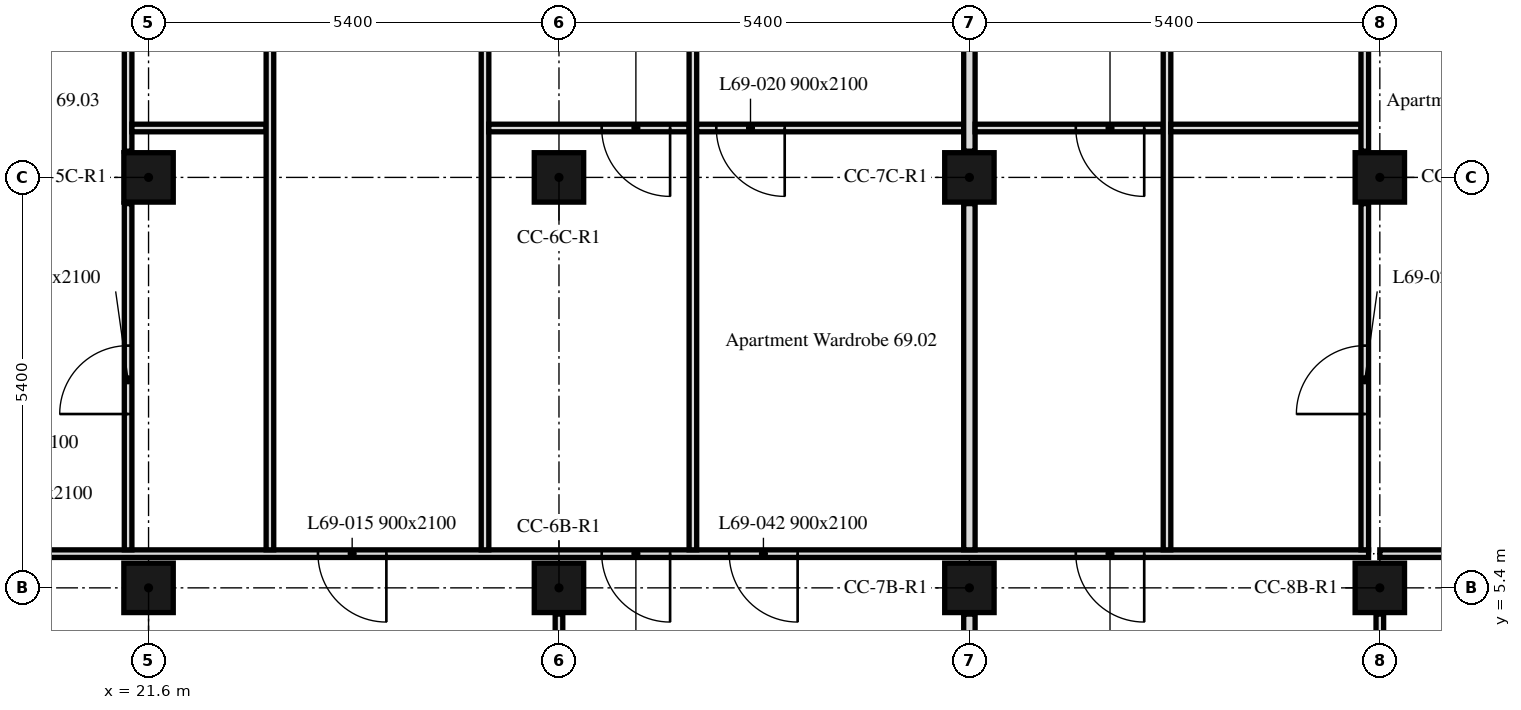
"""IFC4 building model, lengths in metres.
Left out: names, types, materials, properties, quantities, classifications, styles, units other than length and angle.
Written with IfcOpenShell. Run it as: python <this file> out.ifc"""

import sys

from ifc_helpers import new_model, si_unit, direction, frame, frame_2d, origin, origin_2d, place, context, subcontext, project, spatial, rectangle, extrude, element, fill, save


model = new_model("IFC4")
c1 = context("Model", 3, precision=1e-05, world=origin(), true_north=direction((0.0, 1.0)))
c2 = subcontext(c1, "Body", "Model", "MODEL_VIEW")
j1 = project(units=[si_unit("LENGTHUNIT", "METRE"), si_unit("PLANEANGLEUNIT", "RADIAN")], contexts=[c1])
p1 = place(None, origin())
s1 = spatial("IfcSite", under=j1, at=p1, CompositionType="ELEMENT")
p2 = place(p1, origin())
s2 = spatial("IfcBuilding", under=s1, at=p2, CompositionType="ELEMENT")
p3 = place(p2, frame((0.0, 0.0, 281.8)))
s3 = spatial("IfcBuildingStorey", under=s2, at=p3, CompositionType="ELEMENT", Elevation=281.8)
for number, where, z_axis, x_axis in (
    (1, (21.6, 5.4, 0.0), (0.0, 0.0, 1.0), (1.0, 0.0, 0.0)),
    (2, (27.0, 5.4, 0.0), (0.0, 0.0, 1.0), (1.0, 0.0, 0.0)),
    (3, (32.4, 5.4, 0.0), (0.0, 0.0, 1.0), (1.0, 0.0, 0.0)),
    (4, (37.8, 5.4, 0.0), (0.0, 0.0, 1.0), (1.0, 0.0, 0.0)),
    (5, (21.6, 10.8, 0.0), (0.0, 0.0, 1.0), (1.0, 0.0, 0.0)),
    (6, (27.0, 10.8, 0.0), (0.0, 0.0, 1.0), (1.0, 0.0, 0.0)),
    (7, (32.4, 10.8, 0.0), (0.0, 0.0, 1.0), (1.0, 0.0, 0.0)),
    (8, (37.8, 10.8, 0.0), (0.0, 0.0, 1.0), (1.0, 0.0, 0.0)),
):
    element("IfcColumn", number, at=place(p3, frame(where, z_axis=z_axis, x_axis=x_axis)), inside=s3, PredefinedType="COLUMN", context=c2, shape_type="SweptSolid", body=[
        extrude(rectangle(XDim=0.65, YDim=0.65, at=origin_2d()), origin(), (0.0, 0.0, 1.0), 3.0),
    ])
p4 = place(p3, frame((37.652, 5.85, 0.0), z_axis=(0.0, 0.0, 1.0), x_axis=(-1.0, 0.0, 0.0)))
e9 = element("IfcWall", 9, at=p4, inside=s3, PredefinedType="PARTITIONING", context=c2, shape_type="SweptSolid", body=[
    extrude(rectangle(XDim=31.501, YDim=0.1, at=frame_2d((15.75, 0.0))), origin(), (0.0, 0.0, 1.0), 2.4),
])
p5 = place(p4, frame((12.923, 0.0, 0.0)))
e10 = element("IfcOpeningElement", 10, at=p5, cuts=e9, PredefinedType="OPENING", context=c2, shape_type="SweptSolid", body=[
    extrude(rectangle(XDim=0.9, YDim=2.1, at=frame_2d((0.45, 1.05))), frame((0.0, 0.05, 0.0), z_axis=(0.0, -1.0, 0.0), x_axis=(1.0, 0.0, 0.0)), (0.0, 0.0, 1.0), 0.1),
])
p6 = place(p4, frame((29.422, 0.0, 0.0)))
e11 = element("IfcOpeningElement", 11, at=p6, cuts=e9, PredefinedType="OPENING", context=c2, shape_type="SweptSolid", body=[
    extrude(rectangle(XDim=0.9, YDim=2.1, at=frame_2d((0.45, 1.05))), frame((0.0, 0.05, 0.0), z_axis=(0.0, -1.0, 0.0), x_axis=(1.0, 0.0, 0.0)), (0.0, 0.0, 1.0), 0.1),
])
p7 = place(p4, frame((28.182, 0.0, 0.0)))
e12 = element("IfcOpeningElement", 12, at=p7, cuts=e9, PredefinedType="OPENING", context=c2, shape_type="SweptSolid", body=[
    extrude(rectangle(XDim=0.9, YDim=2.1, at=frame_2d((0.45, 1.05))), frame((0.0, 0.05, 0.0), z_axis=(0.0, -1.0, 0.0), x_axis=(1.0, 0.0, 0.0)), (0.0, 0.0, 1.0), 0.1),
])
p8 = place(p4, frame((23.942, 0.0, 0.0)))
e13 = element("IfcOpeningElement", 13, at=p8, cuts=e9, PredefinedType="OPENING", context=c2, shape_type="SweptSolid", body=[
    extrude(rectangle(XDim=0.9, YDim=2.1, at=frame_2d((0.45, 1.05))), frame((0.0, 0.05, 0.0), z_axis=(0.0, -1.0, 0.0), x_axis=(1.0, 0.0, 0.0)), (0.0, 0.0, 1.0), 0.1),
])
p9 = place(p4, frame((22.572, 0.0, 0.0)))
e14 = element("IfcOpeningElement", 14, at=p9, cuts=e9, PredefinedType="OPENING", context=c2, shape_type="SweptSolid", body=[
    extrude(rectangle(XDim=0.9, YDim=2.1, at=frame_2d((0.45, 1.05))), frame((0.0, 0.05, 0.0), z_axis=(0.0, -1.0, 0.0), x_axis=(1.0, 0.0, 0.0)), (0.0, 0.0, 1.0), 0.1),
])
p10 = place(p4, frame((19.466, 0.0, 0.0)))
e15 = element("IfcOpeningElement", 15, at=p10, cuts=e9, PredefinedType="OPENING", context=c2, shape_type="SweptSolid", body=[
    extrude(rectangle(XDim=0.9, YDim=2.1, at=frame_2d((0.45, 1.05))), frame((0.0, 0.05, 0.0), z_axis=(0.0, -1.0, 0.0), x_axis=(1.0, 0.0, 0.0)), (0.0, 0.0, 1.0), 0.1),
])
p11 = place(p4, frame((9.19, 0.0, 0.0)))
e16 = element("IfcOpeningElement", 16, at=p11, cuts=e9, PredefinedType="OPENING", context=c2, shape_type="SweptSolid", body=[
    extrude(rectangle(XDim=0.9, YDim=2.1, at=frame_2d((0.45, 1.05))), frame((0.0, 0.05, 0.0), z_axis=(0.0, -1.0, 0.0), x_axis=(1.0, 0.0, 0.0)), (0.0, 0.0, 1.0), 0.1),
])
p12 = place(p4, frame((7.512, 0.0, 0.0)))
e17 = element("IfcOpeningElement", 17, at=p12, cuts=e9, PredefinedType="OPENING", context=c2, shape_type="SweptSolid", body=[
    extrude(rectangle(XDim=0.9, YDim=2.1, at=frame_2d((0.45, 1.05))), frame((0.0, 0.05, 0.0), z_axis=(0.0, -1.0, 0.0), x_axis=(1.0, 0.0, 0.0)), (0.0, 0.0, 1.0), 0.1),
])
p13 = place(p4, frame((2.952, 0.0, 0.0)))
e18 = element("IfcOpeningElement", 18, at=p13, cuts=e9, PredefinedType="OPENING", context=c2, shape_type="SweptSolid", body=[
    extrude(rectangle(XDim=0.9, YDim=2.1, at=frame_2d((0.45, 1.05))), frame((0.0, 0.05, 0.0), z_axis=(0.0, -1.0, 0.0), x_axis=(1.0, 0.0, 0.0)), (0.0, 0.0, 1.0), 0.1),
])
p14 = place(p4, frame((18.096, 0.0, 0.0)))
e19 = element("IfcOpeningElement", 19, at=p14, cuts=e9, PredefinedType="OPENING", context=c2, shape_type="SweptSolid", body=[
    extrude(rectangle(XDim=0.9, YDim=2.1, at=frame_2d((0.45, 1.05))), frame((0.0, 0.05, 0.0), z_axis=(0.0, -1.0, 0.0), x_axis=(1.0, 0.0, 0.0)), (0.0, 0.0, 1.0), 0.1),
])
p15 = place(p3, frame((27.0, 0.751, 0.0), z_axis=(0.0, 0.0, 1.0), x_axis=(0.0, 1.0, 0.0)))
e20 = element("IfcWall", 20, at=p15, inside=s3, PredefinedType="PARTITIONING", context=c2, shape_type="SweptSolid", body=[
    extrude(rectangle(XDim=4.304, YDim=0.1, at=frame_2d((2.152, 0.0))), origin(), (0.0, 0.0, 1.0), 2.4),
])
p16 = place(p15, frame((1.18, 0.0, 0.0)))
e21 = element("IfcOpeningElement", 21, at=p16, cuts=e20, PredefinedType="OPENING", context=c2, shape_type="SweptSolid", body=[
    extrude(rectangle(XDim=0.9, YDim=2.1, at=frame_2d((0.45, 1.05))), frame((0.0, 0.05, 0.0), z_axis=(0.0, -1.0, 0.0), x_axis=(1.0, 0.0, 0.0)), (0.0, 0.0, 1.0), 0.1),
])
p17 = place(p3, frame((32.4, 0.751, 0.0), z_axis=(0.0, 0.0, 1.0), x_axis=(0.0, 1.0, 0.0)))
e22 = element("IfcWall", 22, at=p17, inside=s3, PredefinedType="PARTITIONING", context=c2, shape_type="SweptSolid", body=[
    extrude(rectangle(XDim=4.304, YDim=0.15, at=frame_2d((2.152, 0.0))), origin(), (0.0, 0.0, 1.0), 2.4),
])
p18 = place(p3, frame((21.331, 5.9, 0.0), z_axis=(0.0, 0.0, 1.0), x_axis=(0.0, 1.0, 0.0)))
e23 = element("IfcWall", 23, at=p18, inside=s3, PredefinedType="PARTITIONING", context=c2, shape_type="SweptSolid", body=[
    extrude(rectangle(XDim=4.555, YDim=0.1, at=frame_2d((2.278, 0.0))), origin(), (0.0, 0.0, 1.0), 3.0),
])
p19 = place(p18, frame((1.787, 0.0, 0.0)))
e24 = element("IfcOpeningElement", 24, at=p19, cuts=e23, PredefinedType="OPENING", context=c2, shape_type="SweptSolid", body=[
    extrude(rectangle(XDim=0.9, YDim=2.1, at=frame_2d((0.45, 1.05))), frame((0.0, 0.05, 0.0), z_axis=(0.0, -1.0, 0.0), x_axis=(1.0, 0.0, 0.0)), (0.0, 0.0, 1.0), 0.1),
])
p20 = place(p3, frame((21.331, 11.145, 0.0), z_axis=(0.0, 0.0, 1.0), x_axis=(0.0, 1.0, 0.0)))
e25 = element("IfcWall", 25, at=p20, inside=s3, PredefinedType="PARTITIONING", context=c2, shape_type="SweptSolid", body=[
    extrude(rectangle(XDim=2.73, YDim=0.1, at=frame_2d((1.365, 0.0))), origin(), (0.0, 0.0, 1.0), 3.0),
])
p21 = place(p20, frame((1.58, 0.0, 0.0)))
e26 = element("IfcOpeningElement", 26, at=p21, cuts=e25, PredefinedType="OPENING", context=c2, shape_type="SweptSolid", body=[
    extrude(rectangle(XDim=0.9, YDim=2.1, at=frame_2d((0.45, 1.05))), frame((0.0, 0.05, 0.0), z_axis=(0.0, -1.0, 0.0), x_axis=(1.0, 0.0, 0.0)), (0.0, 0.0, 1.0), 0.1),
])
p22 = place(p3, frame((23.147, 11.45, 0.0), z_axis=(0.0, 0.0, 1.0), x_axis=(-1.0, 0.0, 0.0)))
e27 = element("IfcWall", 27, at=p22, inside=s3, PredefinedType="PARTITIONING", context=c2, shape_type="SweptSolid", body=[
    extrude(rectangle(XDim=1.766, YDim=0.1, at=frame_2d((0.883, 0.0))), origin(), (0.0, 0.0, 1.0), 2.4),
])
for number, where, z_axis, x_axis in (
    (28, (23.197, 5.9, 0.0), (0.0, 0.0, 1.0), (0.0, 1.0, 0.0)),
    (29, (26.027, 5.9, 0.0), (0.0, 0.0, 1.0), (0.0, 1.0, 0.0)),
):
    element("IfcWall", number, at=place(p3, frame(where, z_axis=z_axis, x_axis=x_axis)), inside=s3, PredefinedType="PARTITIONING", context=c2, shape_type="SweptSolid", body=[
        extrude(rectangle(XDim=7.975, YDim=0.1, at=frame_2d((3.988, 0.0))), origin(), (0.0, 0.0, 1.0), 3.0),
    ])
p23 = place(p3, frame((28.712, 11.45, 0.0), z_axis=(0.0, 0.0, 1.0), x_axis=(-1.0, 0.0, 0.0)))
e30 = element("IfcWall", 30, at=p23, inside=s3, PredefinedType="PARTITIONING", context=c2, shape_type="SweptSolid", body=[
    extrude(rectangle(XDim=2.635, YDim=0.1, at=frame_2d((1.317, 0.0))), origin(), (0.0, 0.0, 1.0), 2.4),
])
p24 = place(p23, frame((0.25, 0.0, 0.0)))
e31 = element("IfcOpeningElement", 31, at=p24, cuts=e30, PredefinedType="OPENING", context=c2, shape_type="SweptSolid", body=[
    extrude(rectangle(XDim=0.9, YDim=2.1, at=frame_2d((0.45, 1.05))), frame((0.0, 0.05, 0.0), z_axis=(0.0, -1.0, 0.0), x_axis=(1.0, 0.0, 0.0)), (0.0, 0.0, 1.0), 0.1),
])
p25 = place(p3, frame((28.762, 5.9, 0.0), z_axis=(0.0, 0.0, 1.0), x_axis=(0.0, 1.0, 0.0)))
e32 = element("IfcWall", 32, at=p25, inside=s3, PredefinedType="PARTITIONING", context=c2, shape_type="SweptSolid", body=[
    extrude(rectangle(XDim=7.975, YDim=0.1, at=frame_2d((3.988, 0.0))), origin(), (0.0, 0.0, 1.0), 3.0),
])
p26 = place(p3, frame((32.4, 5.9, 0.0), z_axis=(0.0, 0.0, 1.0), x_axis=(0.0, 1.0, 0.0)))
e33 = element("IfcWall", 33, at=p26, inside=s3, PredefinedType="PARTITIONING", context=c2, shape_type="SweptSolid", body=[
    extrude(rectangle(XDim=4.555, YDim=0.15, at=frame_2d((2.278, 0.0))), origin(), (0.0, 0.0, 1.0), 2.4),
])
p27 = place(p3, frame((32.325, 11.45, 0.0), z_axis=(0.0, 0.0, 1.0), x_axis=(-1.0, 0.0, 0.0)))
e34 = element("IfcWall", 34, at=p27, inside=s3, PredefinedType="PARTITIONING", context=c2, shape_type="SweptSolid", body=[
    extrude(rectangle(XDim=3.513, YDim=0.1, at=frame_2d((1.756, 0.0))), origin(), (0.0, 0.0, 1.0), 3.0),
])
p28 = place(p27, frame((2.355, 0.0, 0.0)))
e35 = element("IfcOpeningElement", 35, at=p28, cuts=e34, PredefinedType="OPENING", context=c2, shape_type="SweptSolid", body=[
    extrude(rectangle(XDim=0.9, YDim=2.1, at=frame_2d((0.45, 1.05))), frame((0.0, 0.05, 0.0), z_axis=(0.0, -1.0, 0.0), x_axis=(1.0, 0.0, 0.0)), (0.0, 0.0, 1.0), 0.1),
])
p29 = place(p3, frame((32.4, 11.145, 0.0), z_axis=(0.0, 0.0, 1.0), x_axis=(0.0, 1.0, 0.0)))
e36 = element("IfcWall", 36, at=p29, inside=s3, PredefinedType="PARTITIONING", context=c2, shape_type="SweptSolid", body=[
    extrude(rectangle(XDim=2.73, YDim=0.15, at=frame_2d((1.365, 0.0))), origin(), (0.0, 0.0, 1.0), 2.4),
])
p30 = place(p3, frame((37.8, 0.751, 0.0), z_axis=(0.0, 0.0, 1.0), x_axis=(0.0, 1.0, 0.0)))
e37 = element("IfcWall", 37, at=p30, inside=s3, PredefinedType="PARTITIONING", context=c2, shape_type="SweptSolid", body=[
    extrude(rectangle(XDim=4.304, YDim=0.1, at=frame_2d((2.152, 0.0))), origin(), (0.0, 0.0, 1.0), 2.4),
])
p31 = place(p30, frame((1.18, 0.0, 0.0)))
e38 = element("IfcOpeningElement", 38, at=p31, cuts=e37, PredefinedType="OPENING", context=c2, shape_type="SweptSolid", body=[
    extrude(rectangle(XDim=0.9, YDim=2.1, at=frame_2d((0.45, 1.05))), frame((0.0, 0.05, 0.0), z_axis=(0.0, -1.0, 0.0), x_axis=(1.0, 0.0, 0.0)), (0.0, 0.0, 1.0), 0.1),
])
p32 = place(p3, frame((43.15, 5.85, 0.0), z_axis=(0.0, 0.0, 1.0), x_axis=(-1.0, 0.0, 0.0)))
e39 = element("IfcWall", 39, at=p32, inside=s3, PredefinedType="PARTITIONING", context=c2, shape_type="SweptSolid", body=[
    extrude(rectangle(XDim=5.35, YDim=0.1, at=frame_2d((2.675, 0.0))), origin(), (0.0, 0.0, 1.0), 3.0),
])
p33 = place(p32, frame((3.048, 0.0, 0.0)))
e40 = element("IfcOpeningElement", 40, at=p33, cuts=e39, PredefinedType="OPENING", context=c2, shape_type="SweptSolid", body=[
    extrude(rectangle(XDim=0.9, YDim=2.1, at=frame_2d((0.45, 1.05))), frame((0.0, 0.05, 0.0), z_axis=(0.0, -1.0, 0.0), x_axis=(1.0, 0.0, 0.0)), (0.0, 0.0, 1.0), 0.1),
])
p34 = place(p3, frame((34.95, 11.45, 0.0), z_axis=(0.0, 0.0, 1.0), x_axis=(-1.0, 0.0, 0.0)))
e41 = element("IfcWall", 41, at=p34, inside=s3, PredefinedType="PARTITIONING", context=c2, shape_type="SweptSolid", body=[
    extrude(rectangle(XDim=2.475, YDim=0.1, at=frame_2d((1.237, 0.0))), origin(), (0.0, 0.0, 1.0), 3.0),
])
p35 = place(p34, frame((0.25, 0.0, 0.0)))
e42 = element("IfcOpeningElement", 42, at=p35, cuts=e41, PredefinedType="OPENING", context=c2, shape_type="SweptSolid", body=[
    extrude(rectangle(XDim=0.9, YDim=2.1, at=frame_2d((0.45, 1.05))), frame((0.0, 0.05, 0.0), z_axis=(0.0, -1.0, 0.0), x_axis=(1.0, 0.0, 0.0)), (0.0, 0.0, 1.0), 0.1),
])
p36 = place(p3, frame((35.0, 5.9, 0.0), z_axis=(0.0, 0.0, 1.0), x_axis=(0.0, 1.0, 0.0)))
e43 = element("IfcWall", 43, at=p36, inside=s3, PredefinedType="PARTITIONING", context=c2, shape_type="SweptSolid", body=[
    extrude(rectangle(XDim=7.975, YDim=0.1, at=frame_2d((3.988, 0.0))), origin(), (0.0, 0.0, 1.0), 2.4),
])
p37 = place(p3, frame((37.602, 5.9, 0.0), z_axis=(0.0, 0.0, 1.0), x_axis=(0.0, 1.0, 0.0)))
e44 = element("IfcWall", 44, at=p37, inside=s3, PredefinedType="PARTITIONING", context=c2, shape_type="SweptSolid", body=[
    extrude(rectangle(XDim=4.555, YDim=0.1, at=frame_2d((2.278, 0.0))), origin(), (0.0, 0.0, 1.0), 2.4),
])
p38 = place(p37, frame((1.787, 0.0, 0.0)))
e45 = element("IfcOpeningElement", 45, at=p38, cuts=e44, PredefinedType="OPENING", context=c2, shape_type="SweptSolid", body=[
    extrude(rectangle(XDim=0.9, YDim=2.1, at=frame_2d((0.45, 1.05))), frame((0.0, 0.05, 0.0), z_axis=(0.0, -1.0, 0.0), x_axis=(1.0, 0.0, 0.0)), (0.0, 0.0, 1.0), 0.1),
])
p39 = place(p3, frame((37.552, 11.45, 0.0), z_axis=(0.0, 0.0, 1.0), x_axis=(-1.0, 0.0, 0.0)))
e46 = element("IfcWall", 46, at=p39, inside=s3, PredefinedType="PARTITIONING", context=c2, shape_type="SweptSolid", body=[
    extrude(rectangle(XDim=2.502, YDim=0.1, at=frame_2d((1.251, 0.0))), origin(), (0.0, 0.0, 1.0), 3.0),
])
p40 = place(p3, frame((37.602, 11.145, 0.0), z_axis=(0.0, 0.0, 1.0), x_axis=(0.0, 1.0, 0.0)))
e47 = element("IfcWall", 47, at=p40, inside=s3, PredefinedType="PARTITIONING", context=c2, shape_type="SweptSolid", body=[
    extrude(rectangle(XDim=2.73, YDim=0.1, at=frame_2d((1.365, 0.0))), origin(), (0.0, 0.0, 1.0), 2.4),
])
p41 = place(p40, frame((1.58, 0.0, 0.0)))
e48 = element("IfcOpeningElement", 48, at=p41, cuts=e47, PredefinedType="OPENING", context=c2, shape_type="SweptSolid", body=[
    extrude(rectangle(XDim=0.9, YDim=2.1, at=frame_2d((0.45, 1.05))), frame((0.0, 0.05, 0.0), z_axis=(0.0, -1.0, 0.0), x_axis=(1.0, 0.0, 0.0)), (0.0, 0.0, 1.0), 0.1),
])
p42 = place(p5, origin())
e49 = element("IfcDoor", 49, at=p42, inside=s3, OperationType="SINGLE_SWING_RIGHT", PredefinedType="DOOR", context=c2, shape_type="SweptSolid", body=[
    extrude(rectangle(XDim=0.9, YDim=2.1, at=frame_2d((0.45, 1.05))), frame((0.0, 0.025, 0.0), z_axis=(0.0, -1.0, 0.0), x_axis=(1.0, 0.0, 0.0)), (0.0, 0.0, 1.0), 0.05),
])
fill(e10, e49)
p43 = place(p19, origin())
e50 = element("IfcDoor", 50, at=p43, inside=s3, OperationType="SINGLE_SWING_LEFT", PredefinedType="DOOR", context=c2, shape_type="SweptSolid", body=[
    extrude(rectangle(XDim=0.9, YDim=2.1, at=frame_2d((0.45, 1.05))), frame((0.0, 0.025, 0.0), z_axis=(0.0, -1.0, 0.0), x_axis=(1.0, 0.0, 0.0)), (0.0, 0.0, 1.0), 0.05),
])
fill(e24, e50)
p44 = place(p24, origin())
e51 = element("IfcDoor", 51, at=p44, inside=s3, OperationType="SINGLE_SWING_RIGHT", PredefinedType="DOOR", context=c2, shape_type="SweptSolid", body=[
    extrude(rectangle(XDim=0.9, YDim=2.1, at=frame_2d((0.45, 1.05))), frame((0.0, 0.025, 0.0), z_axis=(0.0, -1.0, 0.0), x_axis=(1.0, 0.0, 0.0)), (0.0, 0.0, 1.0), 0.05),
])
fill(e31, e51)
p45 = place(p28, origin())
e52 = element("IfcDoor", 52, at=p45, inside=s3, OperationType="SINGLE_SWING_RIGHT", PredefinedType="DOOR", context=c2, shape_type="SweptSolid", body=[
    extrude(rectangle(XDim=0.9, YDim=2.1, at=frame_2d((0.45, 1.05))), frame((0.0, 0.025, 0.0), z_axis=(0.0, -1.0, 0.0), x_axis=(1.0, 0.0, 0.0)), (0.0, 0.0, 1.0), 0.05),
])
fill(e35, e52)
p46 = place(p35, origin())
e53 = element("IfcDoor", 53, at=p46, inside=s3, OperationType="SINGLE_SWING_LEFT", PredefinedType="DOOR", context=c2, shape_type="SweptSolid", body=[
    extrude(rectangle(XDim=0.9, YDim=2.1, at=frame_2d((0.45, 1.05))), frame((0.0, 0.025, 0.0), z_axis=(0.0, -1.0, 0.0), x_axis=(1.0, 0.0, 0.0)), (0.0, 0.0, 1.0), 0.05),
])
fill(e42, e53)
p47 = place(p38, origin())
e54 = element("IfcDoor", 54, at=p47, inside=s3, OperationType="SINGLE_SWING_RIGHT", PredefinedType="DOOR", context=c2, shape_type="SweptSolid", body=[
    extrude(rectangle(XDim=0.9, YDim=2.1, at=frame_2d((0.45, 1.05))), frame((0.0, 0.025, 0.0), z_axis=(0.0, -1.0, 0.0), x_axis=(1.0, 0.0, 0.0)), (0.0, 0.0, 1.0), 0.05),
])
fill(e45, e54)
p48 = place(p11, origin())
e55 = element("IfcDoor", 55, at=p48, inside=s3, OperationType="SINGLE_SWING_LEFT", PredefinedType="DOOR", context=c2, shape_type="SweptSolid", body=[
    extrude(rectangle(XDim=0.9, YDim=2.1, at=frame_2d((0.45, 1.05))), frame((0.0, 0.025, 0.0), z_axis=(0.0, -1.0, 0.0), x_axis=(1.0, 0.0, 0.0)), (0.0, 0.0, 1.0), 0.05),
])
fill(e16, e55)
p49 = place(p12, origin())
e56 = element("IfcDoor", 56, at=p49, inside=s3, OperationType="SINGLE_SWING_RIGHT", PredefinedType="DOOR", context=c2, shape_type="SweptSolid", body=[
    extrude(rectangle(XDim=0.9, YDim=2.1, at=frame_2d((0.45, 1.05))), frame((0.0, 0.025, 0.0), z_axis=(0.0, -1.0, 0.0), x_axis=(1.0, 0.0, 0.0)), (0.0, 0.0, 1.0), 0.05),
])
fill(e17, e56)
p50 = place(p13, origin())
e57 = element("IfcDoor", 57, at=p50, inside=s3, OperationType="SINGLE_SWING_RIGHT", PredefinedType="DOOR", context=c2, shape_type="SweptSolid", body=[
    extrude(rectangle(XDim=0.9, YDim=2.1, at=frame_2d((0.45, 1.05))), frame((0.0, 0.025, 0.0), z_axis=(0.0, -1.0, 0.0), x_axis=(1.0, 0.0, 0.0)), (0.0, 0.0, 1.0), 0.05),
])
fill(e18, e57)
save(model, sys.argv[1])
